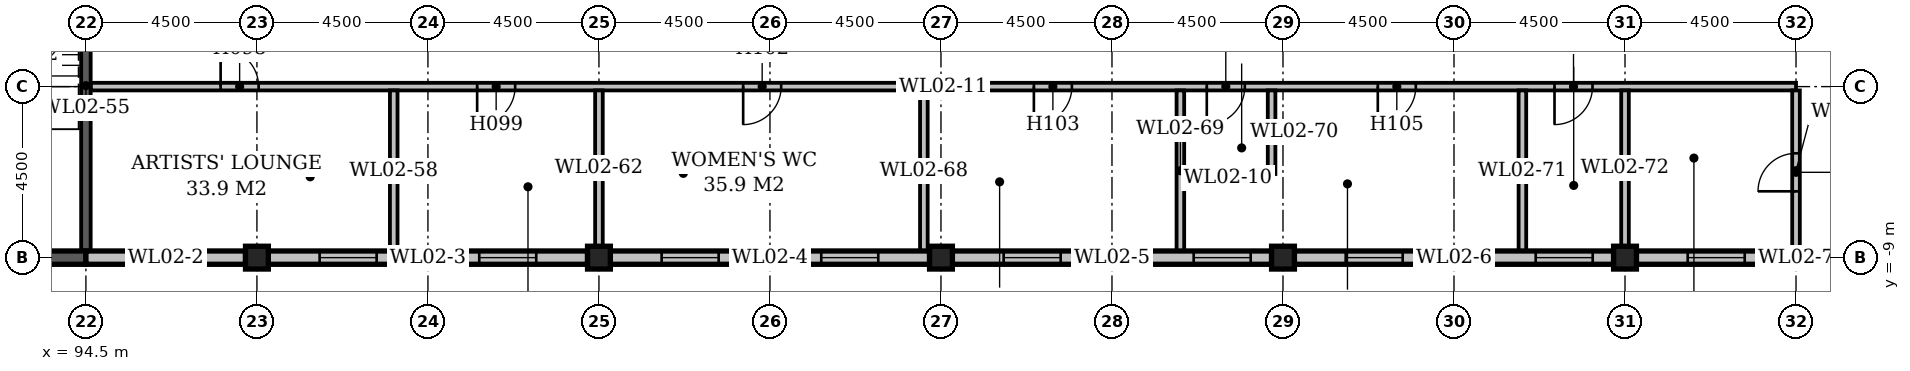
"""IFC4 building model, lengths in metres.
Left out: names, types, materials, properties, quantities, classifications, styles, units other than length and angle.
Written with IfcOpenShell. Run it as: python <this file> out.ifc"""

import sys

from ifc_helpers import new_model, si_unit, direction, frame, frame_2d, origin, origin_2d, place, context, subcontext, project, spatial, rectangle, extrude, element, fill, save


model = new_model("IFC4")
c1 = context("Model", 3, precision=1e-05, world=origin(), true_north=direction((0.0, 1.0)))
c2 = subcontext(c1, "Body", "Model", "MODEL_VIEW")
j1 = project(units=[si_unit("LENGTHUNIT", "METRE"), si_unit("PLANEANGLEUNIT", "RADIAN")], contexts=[c1])
p1 = place(None, origin())
s1 = spatial("IfcSite", under=j1, at=p1, CompositionType="ELEMENT")
p2 = place(p1, origin())
s2 = spatial("IfcBuilding", under=s1, at=p2, CompositionType="ELEMENT")
p3 = place(p2, frame((0.0, 0.0, 14.0)))
s3 = spatial("IfcBuildingStorey", under=s2, at=p3, CompositionType="ELEMENT", Elevation=14.0)
for number, where, z_axis, x_axis in (
    (1, (99.0, -9.0, 0.0), (0.0, 0.0, 1.0), (1.0, 0.0, 0.0)),
    (2, (108.0, -9.0, 0.0), (0.0, 0.0, 1.0), (1.0, 0.0, 0.0)),
    (3, (117.0, -9.0, 0.0), (0.0, 0.0, 1.0), (1.0, 0.0, 0.0)),
    (4, (126.0, -9.0, 0.0), (0.0, 0.0, 1.0), (1.0, 0.0, 0.0)),
    (5, (135.0, -9.0, 0.0), (0.0, 0.0, 1.0), (1.0, 0.0, 0.0)),
):
    element("IfcColumn", number, at=place(p3, frame(where, z_axis=z_axis, x_axis=x_axis)), inside=s3, PredefinedType="COLUMN", context=c2, shape_type="SweptSolid", body=[
        extrude(rectangle(XDim=0.6, YDim=0.6, at=origin_2d()), origin(), (0.0, 0.0, 1.0), 4.7),
    ])
p4 = place(p3, frame((90.35, -9.0, 0.0), z_axis=(0.0, 0.0, 1.0), x_axis=(1.0, 0.0, 0.0)))
e6 = element("IfcWall", 6, at=p4, inside=s3, PredefinedType="STANDARD", context=c2, shape_type="SweptSolid", body=[
    extrude(rectangle(XDim=4.15, YDim=0.35, at=frame_2d((2.075, 0.0))), origin(), (0.0, 0.0, 1.0), 5.0),
])
p5 = place(p3, frame((94.5, -9.0, 0.0), z_axis=(0.0, 0.0, 1.0), x_axis=(1.0, 0.0, 0.0)))
e7 = element("IfcWall", 7, at=p5, inside=s3, PredefinedType="STANDARD", context=c2, shape_type="SweptSolid", body=[
    extrude(rectangle(XDim=4.2, YDim=0.35, at=frame_2d((2.1, 0.0))), origin(), (0.0, 0.0, 1.0), 4.1),
])
p6 = place(p5, frame((1.35, 0.0, 1.0)))
e8 = element("IfcOpeningElement", 8, at=p6, cuts=e7, PredefinedType="OPENING", context=c2, shape_type="SweptSolid", body=[
    extrude(rectangle(XDim=1.5, YDim=2.4, at=frame_2d((0.75, 1.2))), frame((0.0, 0.187, 0.0), z_axis=(0.0, -1.0, 0.0), x_axis=(1.0, 0.0, 0.0)), (0.0, 0.0, 1.0), 0.374),
])
p7 = place(p3, frame((99.3, -9.0, 0.0), z_axis=(0.0, 0.0, 1.0), x_axis=(1.0, 0.0, 0.0)))
e9 = element("IfcWall", 9, at=p7, inside=s3, PredefinedType="STANDARD", context=c2, shape_type="SweptSolid", body=[
    extrude(rectangle(XDim=8.4, YDim=0.35, at=frame_2d((4.2, 0.0))), origin(), (0.0, 0.0, 1.0), 4.1),
])
p8 = place(p7, frame((1.35, 0.0, 1.0)))
e10 = element("IfcOpeningElement", 10, at=p8, cuts=e9, PredefinedType="OPENING", context=c2, shape_type="SweptSolid", body=[
    extrude(rectangle(XDim=1.5, YDim=2.4, at=frame_2d((0.75, 1.2))), frame((0.0, 0.187, 0.0), z_axis=(0.0, -1.0, 0.0), x_axis=(1.0, 0.0, 0.0)), (0.0, 0.0, 1.0), 0.374),
])
p9 = place(p7, frame((5.55, 0.0, 1.0)))
e11 = element("IfcOpeningElement", 11, at=p9, cuts=e9, PredefinedType="OPENING", context=c2, shape_type="SweptSolid", body=[
    extrude(rectangle(XDim=1.5, YDim=2.4, at=frame_2d((0.75, 1.2))), frame((0.0, 0.187, 0.0), z_axis=(0.0, -1.0, 0.0), x_axis=(1.0, 0.0, 0.0)), (0.0, 0.0, 1.0), 0.374),
])
p10 = place(p3, frame((108.3, -9.0, 0.0), z_axis=(0.0, 0.0, 1.0), x_axis=(1.0, 0.0, 0.0)))
e12 = element("IfcWall", 12, at=p10, inside=s3, PredefinedType="STANDARD", context=c2, shape_type="SweptSolid", body=[
    extrude(rectangle(XDim=8.4, YDim=0.35, at=frame_2d((4.2, 0.0))), origin(), (0.0, 0.0, 1.0), 4.1),
])
p11 = place(p10, frame((1.35, 0.0, 1.0)))
e13 = element("IfcOpeningElement", 13, at=p11, cuts=e12, PredefinedType="OPENING", context=c2, shape_type="SweptSolid", body=[
    extrude(rectangle(XDim=1.5, YDim=2.4, at=frame_2d((0.75, 1.2))), frame((0.0, 0.187, 0.0), z_axis=(0.0, -1.0, 0.0), x_axis=(1.0, 0.0, 0.0)), (0.0, 0.0, 1.0), 0.374),
])
p12 = place(p10, frame((5.55, 0.0, 1.0)))
e14 = element("IfcOpeningElement", 14, at=p12, cuts=e12, PredefinedType="OPENING", context=c2, shape_type="SweptSolid", body=[
    extrude(rectangle(XDim=1.5, YDim=2.4, at=frame_2d((0.75, 1.2))), frame((0.0, 0.187, 0.0), z_axis=(0.0, -1.0, 0.0), x_axis=(1.0, 0.0, 0.0)), (0.0, 0.0, 1.0), 0.374),
])
p13 = place(p3, frame((117.3, -9.0, 0.0), z_axis=(0.0, 0.0, 1.0), x_axis=(1.0, 0.0, 0.0)))
e15 = element("IfcWall", 15, at=p13, inside=s3, PredefinedType="STANDARD", context=c2, shape_type="SweptSolid", body=[
    extrude(rectangle(XDim=8.4, YDim=0.35, at=frame_2d((4.2, 0.0))), origin(), (0.0, 0.0, 1.0), 4.1),
])
p14 = place(p13, frame((1.35, 0.0, 1.0)))
e16 = element("IfcOpeningElement", 16, at=p14, cuts=e15, PredefinedType="OPENING", context=c2, shape_type="SweptSolid", body=[
    extrude(rectangle(XDim=1.5, YDim=2.4, at=frame_2d((0.75, 1.2))), frame((0.0, 0.187, 0.0), z_axis=(0.0, -1.0, 0.0), x_axis=(1.0, 0.0, 0.0)), (0.0, 0.0, 1.0), 0.374),
])
p15 = place(p13, frame((6.35, 0.0, 1.0)))
e17 = element("IfcOpeningElement", 17, at=p15, cuts=e15, PredefinedType="OPENING", context=c2, shape_type="SweptSolid", body=[
    extrude(rectangle(XDim=1.5, YDim=2.4, at=frame_2d((0.75, 1.2))), frame((0.0, 0.187, 0.0), z_axis=(0.0, -1.0, 0.0), x_axis=(1.0, 0.0, 0.0)), (0.0, 0.0, 1.0), 0.374),
])
p16 = place(p3, frame((126.3, -9.0, 0.0), z_axis=(0.0, 0.0, 1.0), x_axis=(1.0, 0.0, 0.0)))
e18 = element("IfcWall", 18, at=p16, inside=s3, PredefinedType="STANDARD", context=c2, shape_type="SweptSolid", body=[
    extrude(rectangle(XDim=8.4, YDim=0.35, at=frame_2d((4.2, 0.0))), origin(), (0.0, 0.0, 1.0), 4.1),
])
p17 = place(p16, frame((1.35, 0.0, 1.0)))
e19 = element("IfcOpeningElement", 19, at=p17, cuts=e18, PredefinedType="OPENING", context=c2, shape_type="SweptSolid", body=[
    extrude(rectangle(XDim=1.5, YDim=2.4, at=frame_2d((0.75, 1.2))), frame((0.0, 0.187, 0.0), z_axis=(0.0, -1.0, 0.0), x_axis=(1.0, 0.0, 0.0)), (0.0, 0.0, 1.0), 0.374),
])
p18 = place(p16, frame((6.35, 0.0, 1.0)))
e20 = element("IfcOpeningElement", 20, at=p18, cuts=e18, PredefinedType="OPENING", context=c2, shape_type="SweptSolid", body=[
    extrude(rectangle(XDim=1.5, YDim=2.4, at=frame_2d((0.75, 1.2))), frame((0.0, 0.187, 0.0), z_axis=(0.0, -1.0, 0.0), x_axis=(1.0, 0.0, 0.0)), (0.0, 0.0, 1.0), 0.374),
])
p19 = place(p3, frame((135.3, -9.0, 0.0), z_axis=(0.0, 0.0, 1.0), x_axis=(1.0, 0.0, 0.0)))
e21 = element("IfcWall", 21, at=p19, inside=s3, PredefinedType="STANDARD", context=c2, shape_type="SweptSolid", body=[
    extrude(rectangle(XDim=8.4, YDim=0.35, at=frame_2d((4.2, 0.0))), origin(), (0.0, 0.0, 1.0), 4.1),
])
p20 = place(p19, frame((1.35, 0.0, 1.0)))
e22 = element("IfcOpeningElement", 22, at=p20, cuts=e21, PredefinedType="OPENING", context=c2, shape_type="SweptSolid", body=[
    extrude(rectangle(XDim=1.5, YDim=2.4, at=frame_2d((0.75, 1.2))), frame((0.0, 0.187, 0.0), z_axis=(0.0, -1.0, 0.0), x_axis=(1.0, 0.0, 0.0)), (0.0, 0.0, 1.0), 0.374),
])
p21 = place(p3, frame((123.4, -6.9, 0.0), z_axis=(0.0, 0.0, 1.0), x_axis=(1.0, 0.0, 0.0)))
e23 = element("IfcWall", 23, at=p21, inside=s3, PredefinedType="STANDARD", context=c2, shape_type="SweptSolid", body=[
    extrude(rectangle(XDim=2.3, YDim=0.2, at=frame_2d((1.15, 0.0))), origin(), (0.0, 0.0, 1.0), 4.7),
])
p22 = place(p3, frame((94.625, -4.5, 0.0), z_axis=(0.0, 0.0, 1.0), x_axis=(1.0, 0.0, 0.0)))
e24 = element("IfcWall", 24, at=p22, inside=s3, PredefinedType="STANDARD", context=c2, shape_type="SweptSolid", body=[
    extrude(rectangle(XDim=44.875, YDim=0.2, at=frame_2d((22.438, 0.0))), origin(), (0.0, 0.0, 1.0), 4.7),
])
p23 = place(p22, frame((3.42, 0.0, 0.0)))
e25 = element("IfcOpeningElement", 25, at=p23, cuts=e24, PredefinedType="OPENING", context=c2, shape_type="SweptSolid", body=[
    extrude(rectangle(XDim=1.0, YDim=2.1, at=frame_2d((0.5, 1.05))), frame((0.0, 0.112, 0.0), z_axis=(0.0, -1.0, 0.0), x_axis=(1.0, 0.0, 0.0)), (0.0, 0.0, 1.0), 0.224),
])
p24 = place(p22, frame((10.17, 0.0, 0.0)))
e26 = element("IfcOpeningElement", 26, at=p24, cuts=e24, PredefinedType="OPENING", context=c2, shape_type="SweptSolid", body=[
    extrude(rectangle(XDim=1.0, YDim=2.1, at=frame_2d((0.5, 1.05))), frame((0.0, 0.112, 0.0), z_axis=(0.0, -1.0, 0.0), x_axis=(1.0, 0.0, 0.0)), (0.0, 0.0, 1.0), 0.224),
])
p25 = place(p22, frame((17.17, 0.0, 0.0)))
e27 = element("IfcOpeningElement", 27, at=p25, cuts=e24, PredefinedType="OPENING", context=c2, shape_type="SweptSolid", body=[
    extrude(rectangle(XDim=1.0, YDim=2.1, at=frame_2d((0.5, 1.05))), frame((0.0, 0.112, 0.0), z_axis=(0.0, -1.0, 0.0), x_axis=(1.0, 0.0, 0.0)), (0.0, 0.0, 1.0), 0.224),
])
p26 = place(p22, frame((24.82, 0.0, 0.0)))
e28 = element("IfcOpeningElement", 28, at=p26, cuts=e24, PredefinedType="OPENING", context=c2, shape_type="SweptSolid", body=[
    extrude(rectangle(XDim=1.0, YDim=2.1, at=frame_2d((0.5, 1.05))), frame((0.0, 0.112, 0.0), z_axis=(0.0, -1.0, 0.0), x_axis=(1.0, 0.0, 0.0)), (0.0, 0.0, 1.0), 0.224),
])
p27 = place(p22, frame((29.37, 0.0, 0.0)))
e29 = element("IfcOpeningElement", 29, at=p27, cuts=e24, PredefinedType="OPENING", context=c2, shape_type="SweptSolid", body=[
    extrude(rectangle(XDim=1.0, YDim=2.1, at=frame_2d((0.5, 1.05))), frame((0.0, 0.112, 0.0), z_axis=(0.0, -1.0, 0.0), x_axis=(1.0, 0.0, 0.0)), (0.0, 0.0, 1.0), 0.224),
])
p28 = place(p22, frame((33.87, 0.0, 0.0)))
e30 = element("IfcOpeningElement", 30, at=p28, cuts=e24, PredefinedType="OPENING", context=c2, shape_type="SweptSolid", body=[
    extrude(rectangle(XDim=1.0, YDim=2.1, at=frame_2d((0.5, 1.05))), frame((0.0, 0.112, 0.0), z_axis=(0.0, -1.0, 0.0), x_axis=(1.0, 0.0, 0.0)), (0.0, 0.0, 1.0), 0.224),
])
p29 = place(p22, frame((38.52, 0.0, 0.0)))
e31 = element("IfcOpeningElement", 31, at=p29, cuts=e24, PredefinedType="OPENING", context=c2, shape_type="SweptSolid", body=[
    extrude(rectangle(XDim=1.0, YDim=2.1, at=frame_2d((0.5, 1.05))), frame((0.0, 0.112, 0.0), z_axis=(0.0, -1.0, 0.0), x_axis=(1.0, 0.0, 0.0)), (0.0, 0.0, 1.0), 0.224),
])
p30 = place(p3, frame((94.5, -8.825, 0.0), z_axis=(0.0, 0.0, 1.0), x_axis=(0.0, 1.0, 0.0)))
e32 = element("IfcWall", 32, at=p30, inside=s3, PredefinedType="STANDARD", context=c2, shape_type="SweptSolid", body=[
    extrude(rectangle(XDim=8.7, YDim=0.25, at=frame_2d((4.35, 0.0))), origin(), (0.0, 0.0, 1.0), 5.0),
])
p31 = place(p30, frame((7.22, 0.0, 0.0)))
e33 = element("IfcOpeningElement", 33, at=p31, cuts=e32, PredefinedType="OPENING", context=c2, shape_type="SweptSolid", body=[
    extrude(rectangle(XDim=1.2, YDim=2.1, at=frame_2d((0.6, 1.05))), frame((0.0, 0.137, 0.0), z_axis=(0.0, -1.0, 0.0), x_axis=(1.0, 0.0, 0.0)), (0.0, 0.0, 1.0), 0.274),
])
p32 = place(p3, frame((102.6, -8.825, 0.0), z_axis=(0.0, 0.0, 1.0), x_axis=(0.0, 1.0, 0.0)))
e34 = element("IfcWall", 34, at=p32, inside=s3, PredefinedType="STANDARD", context=c2, shape_type="SweptSolid", body=[
    extrude(rectangle(XDim=4.225, YDim=0.2, at=frame_2d((2.112, 0.0))), origin(), (0.0, 0.0, 1.0), 4.7),
])
p33 = place(p3, frame((108.0, -8.7, 0.0), z_axis=(0.0, 0.0, 1.0), x_axis=(0.0, 1.0, 0.0)))
e35 = element("IfcWall", 35, at=p33, inside=s3, PredefinedType="STANDARD", context=c2, shape_type="SweptSolid", body=[
    extrude(rectangle(XDim=4.1, YDim=0.2, at=frame_2d((2.05, 0.0))), origin(), (0.0, 0.0, 1.0), 4.7),
])
for number, where, z_axis, x_axis in (
    (36, (116.55, -8.825, 0.0), (0.0, 0.0, 1.0), (0.0, 1.0, 0.0)),
    (37, (123.3, -8.825, 0.0), (0.0, 0.0, 1.0), (0.0, 1.0, 0.0)),
):
    element("IfcWall", number, at=place(p3, frame(where, z_axis=z_axis, x_axis=x_axis)), inside=s3, PredefinedType="STANDARD", context=c2, shape_type="SweptSolid", body=[
        extrude(rectangle(XDim=4.225, YDim=0.2, at=frame_2d((2.112, 0.0))), origin(), (0.0, 0.0, 1.0), 4.7),
    ])
p34 = place(p3, frame((125.7, -6.8, 0.0), z_axis=(0.0, 0.0, 1.0), x_axis=(0.0, 1.0, 0.0)))
e38 = element("IfcWall", 38, at=p34, inside=s3, PredefinedType="STANDARD", context=c2, shape_type="SweptSolid", body=[
    extrude(rectangle(XDim=2.2, YDim=0.2, at=frame_2d((1.1, 0.0))), origin(), (0.0, 0.0, 1.0), 4.7),
])
p35 = place(p3, frame((132.3, -8.825, 0.0), z_axis=(0.0, 0.0, 1.0), x_axis=(0.0, 1.0, 0.0)))
e39 = element("IfcWall", 39, at=p35, inside=s3, PredefinedType="STANDARD", context=c2, shape_type="SweptSolid", body=[
    extrude(rectangle(XDim=4.225, YDim=0.2, at=frame_2d((2.112, 0.0))), origin(), (0.0, 0.0, 1.0), 4.7),
])
p36 = place(p3, frame((135.0, -8.7, 0.0), z_axis=(0.0, 0.0, 1.0), x_axis=(0.0, 1.0, 0.0)))
e40 = element("IfcWall", 40, at=p36, inside=s3, PredefinedType="STANDARD", context=c2, shape_type="SweptSolid", body=[
    extrude(rectangle(XDim=4.1, YDim=0.2, at=frame_2d((2.05, 0.0))), origin(), (0.0, 0.0, 1.0), 4.7),
])
p37 = place(p3, frame((139.5, -8.825, 0.0), z_axis=(0.0, 0.0, 1.0), x_axis=(0.0, 1.0, 0.0)))
e41 = element("IfcWall", 41, at=p37, inside=s3, PredefinedType="STANDARD", context=c2, shape_type="SweptSolid", body=[
    extrude(rectangle(XDim=4.225, YDim=0.2, at=frame_2d((2.112, 0.0))), origin(), (0.0, 0.0, 1.0), 4.7),
])
p38 = place(p37, frame((1.57, 0.0, 0.0)))
e42 = element("IfcOpeningElement", 42, at=p38, cuts=e41, PredefinedType="OPENING", context=c2, shape_type="SweptSolid", body=[
    extrude(rectangle(XDim=1.0, YDim=2.1, at=frame_2d((0.5, 1.05))), frame((0.0, 0.112, 0.0), z_axis=(0.0, -1.0, 0.0), x_axis=(1.0, 0.0, 0.0)), (0.0, 0.0, 1.0), 0.224),
])
p39 = place(p23, origin())
e43 = element("IfcDoor", 43, at=p39, inside=s3, OperationType="SINGLE_SWING_LEFT", PredefinedType="DOOR", context=c2, shape_type="SweptSolid", body=[
    extrude(rectangle(XDim=1.0, YDim=2.1, at=frame_2d((0.5, 1.05))), frame((0.0, 0.025, 0.0), z_axis=(0.0, -1.0, 0.0), x_axis=(1.0, 0.0, 0.0)), (0.0, 0.0, 1.0), 0.05),
])
fill(e25, e43)
p40 = place(p24, frame((1.0, 0.0, 0.0), z_axis=(0.0, 0.0, 1.0), x_axis=(-1.0, 0.0, 0.0)))
e44 = element("IfcDoor", 44, at=p40, inside=s3, OperationType="SINGLE_SWING_RIGHT", PredefinedType="DOOR", context=c2, shape_type="SweptSolid", body=[
    extrude(rectangle(XDim=1.0, YDim=2.1, at=frame_2d((0.5, 1.05))), frame((0.0, 0.025, 0.0), z_axis=(0.0, -1.0, 0.0), x_axis=(1.0, 0.0, 0.0)), (0.0, 0.0, 1.0), 0.05),
])
fill(e26, e44)
p41 = place(p38, origin())
e45 = element("IfcDoor", 45, at=p41, inside=s3, OperationType="SINGLE_SWING_LEFT", PredefinedType="DOOR", context=c2, shape_type="SweptSolid", body=[
    extrude(rectangle(XDim=1.0, YDim=2.1, at=frame_2d((0.5, 1.05))), frame((0.0, 0.025, 0.0), z_axis=(0.0, -1.0, 0.0), x_axis=(1.0, 0.0, 0.0)), (0.0, 0.0, 1.0), 0.05),
])
fill(e42, e45)
p42 = place(p25, frame((1.0, 0.0, 0.0), z_axis=(0.0, 0.0, 1.0), x_axis=(-1.0, 0.0, 0.0)))
e46 = element("IfcDoor", 46, at=p42, inside=s3, OperationType="SINGLE_SWING_RIGHT", PredefinedType="DOOR", context=c2, shape_type="SweptSolid", body=[
    extrude(rectangle(XDim=1.0, YDim=2.1, at=frame_2d((0.5, 1.05))), frame((0.0, 0.025, 0.0), z_axis=(0.0, -1.0, 0.0), x_axis=(1.0, 0.0, 0.0)), (0.0, 0.0, 1.0), 0.05),
])
fill(e27, e46)
p43 = place(p26, frame((1.0, 0.0, 0.0), z_axis=(0.0, 0.0, 1.0), x_axis=(-1.0, 0.0, 0.0)))
e47 = element("IfcDoor", 47, at=p43, inside=s3, OperationType="SINGLE_SWING_RIGHT", PredefinedType="DOOR", context=c2, shape_type="SweptSolid", body=[
    extrude(rectangle(XDim=1.0, YDim=2.1, at=frame_2d((0.5, 1.05))), frame((0.0, 0.025, 0.0), z_axis=(0.0, -1.0, 0.0), x_axis=(1.0, 0.0, 0.0)), (0.0, 0.0, 1.0), 0.05),
])
fill(e28, e47)
p44 = place(p27, frame((1.0, 0.0, 0.0), z_axis=(0.0, 0.0, 1.0), x_axis=(-1.0, 0.0, 0.0)))
e48 = element("IfcDoor", 48, at=p44, inside=s3, OperationType="SINGLE_SWING_RIGHT", PredefinedType="DOOR", context=c2, shape_type="SweptSolid", body=[
    extrude(rectangle(XDim=1.0, YDim=2.1, at=frame_2d((0.5, 1.05))), frame((0.0, 0.025, 0.0), z_axis=(0.0, -1.0, 0.0), x_axis=(1.0, 0.0, 0.0)), (0.0, 0.0, 1.0), 0.05),
])
fill(e29, e48)
p45 = place(p28, frame((1.0, 0.0, 0.0), z_axis=(0.0, 0.0, 1.0), x_axis=(-1.0, 0.0, 0.0)))
e49 = element("IfcDoor", 49, at=p45, inside=s3, OperationType="SINGLE_SWING_RIGHT", PredefinedType="DOOR", context=c2, shape_type="SweptSolid", body=[
    extrude(rectangle(XDim=1.0, YDim=2.1, at=frame_2d((0.5, 1.05))), frame((0.0, 0.025, 0.0), z_axis=(0.0, -1.0, 0.0), x_axis=(1.0, 0.0, 0.0)), (0.0, 0.0, 1.0), 0.05),
])
fill(e30, e49)
p46 = place(p29, frame((1.0, 0.0, 0.0), z_axis=(0.0, 0.0, 1.0), x_axis=(-1.0, 0.0, 0.0)))
e50 = element("IfcDoor", 50, at=p46, inside=s3, OperationType="SINGLE_SWING_RIGHT", PredefinedType="DOOR", context=c2, shape_type="SweptSolid", body=[
    extrude(rectangle(XDim=1.0, YDim=2.1, at=frame_2d((0.5, 1.05))), frame((0.0, 0.025, 0.0), z_axis=(0.0, -1.0, 0.0), x_axis=(1.0, 0.0, 0.0)), (0.0, 0.0, 1.0), 0.05),
])
fill(e31, e50)
p47 = place(p6, origin())
e51 = element("IfcWindow", 51, at=p47, inside=s3, PartitioningType="SINGLE_PANEL", PredefinedType="WINDOW", context=c2, shape_type="SweptSolid", body=[
    extrude(rectangle(XDim=1.5, YDim=2.4, at=frame_2d((0.75, 1.2))), frame((0.0, 0.03, 0.0), z_axis=(0.0, -1.0, 0.0), x_axis=(1.0, 0.0, 0.0)), (0.0, 0.0, 1.0), 0.06),
])
fill(e8, e51)
p48 = place(p8, origin())
e52 = element("IfcWindow", 52, at=p48, inside=s3, PartitioningType="SINGLE_PANEL", PredefinedType="WINDOW", context=c2, shape_type="SweptSolid", body=[
    extrude(rectangle(XDim=1.5, YDim=2.4, at=frame_2d((0.75, 1.2))), frame((0.0, 0.03, 0.0), z_axis=(0.0, -1.0, 0.0), x_axis=(1.0, 0.0, 0.0)), (0.0, 0.0, 1.0), 0.06),
])
fill(e10, e52)
p49 = place(p9, origin())
e53 = element("IfcWindow", 53, at=p49, inside=s3, PartitioningType="SINGLE_PANEL", PredefinedType="WINDOW", context=c2, shape_type="SweptSolid", body=[
    extrude(rectangle(XDim=1.5, YDim=2.4, at=frame_2d((0.75, 1.2))), frame((0.0, 0.03, 0.0), z_axis=(0.0, -1.0, 0.0), x_axis=(1.0, 0.0, 0.0)), (0.0, 0.0, 1.0), 0.06),
])
fill(e11, e53)
p50 = place(p11, origin())
e54 = element("IfcWindow", 54, at=p50, inside=s3, PartitioningType="SINGLE_PANEL", PredefinedType="WINDOW", context=c2, shape_type="SweptSolid", body=[
    extrude(rectangle(XDim=1.5, YDim=2.4, at=frame_2d((0.75, 1.2))), frame((0.0, 0.03, 0.0), z_axis=(0.0, -1.0, 0.0), x_axis=(1.0, 0.0, 0.0)), (0.0, 0.0, 1.0), 0.06),
])
fill(e13, e54)
p51 = place(p12, origin())
e55 = element("IfcWindow", 55, at=p51, inside=s3, PartitioningType="SINGLE_PANEL", PredefinedType="WINDOW", context=c2, shape_type="SweptSolid", body=[
    extrude(rectangle(XDim=1.5, YDim=2.4, at=frame_2d((0.75, 1.2))), frame((0.0, 0.03, 0.0), z_axis=(0.0, -1.0, 0.0), x_axis=(1.0, 0.0, 0.0)), (0.0, 0.0, 1.0), 0.06),
])
fill(e14, e55)
p52 = place(p14, origin())
e56 = element("IfcWindow", 56, at=p52, inside=s3, PartitioningType="SINGLE_PANEL", PredefinedType="WINDOW", context=c2, shape_type="SweptSolid", body=[
    extrude(rectangle(XDim=1.5, YDim=2.4, at=frame_2d((0.75, 1.2))), frame((0.0, 0.03, 0.0), z_axis=(0.0, -1.0, 0.0), x_axis=(1.0, 0.0, 0.0)), (0.0, 0.0, 1.0), 0.06),
])
fill(e16, e56)
p53 = place(p15, origin())
e57 = element("IfcWindow", 57, at=p53, inside=s3, PartitioningType="SINGLE_PANEL", PredefinedType="WINDOW", context=c2, shape_type="SweptSolid", body=[
    extrude(rectangle(XDim=1.5, YDim=2.4, at=frame_2d((0.75, 1.2))), frame((0.0, 0.03, 0.0), z_axis=(0.0, -1.0, 0.0), x_axis=(1.0, 0.0, 0.0)), (0.0, 0.0, 1.0), 0.06),
])
fill(e17, e57)
p54 = place(p17, origin())
e58 = element("IfcWindow", 58, at=p54, inside=s3, PartitioningType="SINGLE_PANEL", PredefinedType="WINDOW", context=c2, shape_type="SweptSolid", body=[
    extrude(rectangle(XDim=1.5, YDim=2.4, at=frame_2d((0.75, 1.2))), frame((0.0, 0.03, 0.0), z_axis=(0.0, -1.0, 0.0), x_axis=(1.0, 0.0, 0.0)), (0.0, 0.0, 1.0), 0.06),
])
fill(e19, e58)
p55 = place(p18, origin())
e59 = element("IfcWindow", 59, at=p55, inside=s3, PartitioningType="SINGLE_PANEL", PredefinedType="WINDOW", context=c2, shape_type="SweptSolid", body=[
    extrude(rectangle(XDim=1.5, YDim=2.4, at=frame_2d((0.75, 1.2))), frame((0.0, 0.03, 0.0), z_axis=(0.0, -1.0, 0.0), x_axis=(1.0, 0.0, 0.0)), (0.0, 0.0, 1.0), 0.06),
])
fill(e20, e59)
p56 = place(p20, origin())
e60 = element("IfcWindow", 60, at=p56, inside=s3, PartitioningType="SINGLE_PANEL", PredefinedType="WINDOW", context=c2, shape_type="SweptSolid", body=[
    extrude(rectangle(XDim=1.5, YDim=2.4, at=frame_2d((0.75, 1.2))), frame((0.0, 0.03, 0.0), z_axis=(0.0, -1.0, 0.0), x_axis=(1.0, 0.0, 0.0)), (0.0, 0.0, 1.0), 0.06),
])
fill(e22, e60)
save(model, sys.argv[1])
